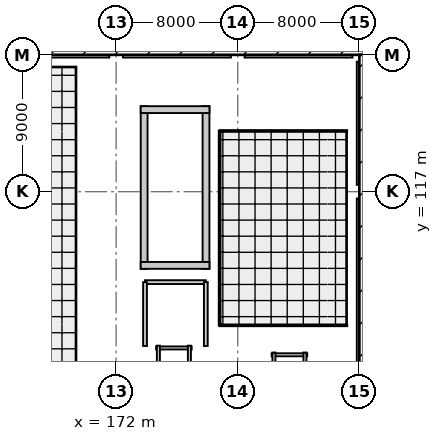
"""IFC4 building model, lengths in metres.
Left out: names, types, materials, properties, quantities, classifications, styles, units other than length and angle.
Written with IfcOpenShell. Run it as: python <this file> out.ifc"""

import sys

from ifc_helpers import new_model, si_unit, direction, frame, frame_2d, origin, origin_2d, place, context, subcontext, project, spatial, rectangle, extrude, element, fill, save


model = new_model("IFC4")
c1 = context("Model", 3, precision=1e-05, world=origin(), true_north=direction((0.0, 1.0)))
c2 = subcontext(c1, "Body", "Model", "MODEL_VIEW")
j1 = project(units=[si_unit("LENGTHUNIT", "METRE"), si_unit("PLANEANGLEUNIT", "RADIAN")], contexts=[c1])
p1 = place(None, origin())
s1 = spatial("IfcSite", under=j1, at=p1, CompositionType="ELEMENT")
p2 = place(p1, origin())
s2 = spatial("IfcBuilding", under=s1, at=p2, CompositionType="ELEMENT")
p3 = place(p2, origin())
s3 = spatial("IfcBuildingStorey", under=s2, at=p3, CompositionType="ELEMENT", Elevation=0.0)
for number, where, z_axis, x_axis in (
    (1, (172.0, 117.0, 0.0), (0.0, 0.0, 1.0), (1.0, 0.0, 0.0)),
    (2, (172.0, 126.0, 0.0), (0.0, 0.0, 1.0), (1.0, 0.0, 0.0)),
    (3, (180.0, 117.0, 0.0), (0.0, 0.0, 1.0), (1.0, 0.0, 0.0)),
    (4, (180.0, 126.0, 0.0), (0.0, 0.0, 1.0), (1.0, 0.0, 0.0)),
    (5, (188.0, 117.0, 0.0), (0.0, 0.0, 1.0), (1.0, 0.0, 0.0)),
    (6, (188.0, 126.0, 0.0), (0.0, 0.0, 1.0), (1.0, 0.0, 0.0)),
):
    element("IfcColumn", number, at=place(p3, frame(where, z_axis=z_axis, x_axis=x_axis)), inside=s3, PredefinedType="COLUMN", context=c2, shape_type="SweptSolid", body=[
        extrude(rectangle(XDim=0.9, YDim=0.9, at=origin_2d()), origin(), (0.0, 0.0, 1.0), 6.6),
    ])
p4 = place(p3, frame((188.0, 116.55, 0.0), z_axis=(0.0, 0.0, 1.0), x_axis=(0.0, -1.0, 0.0)))
e7 = element("IfcWall", 7, at=p4, inside=s3, PredefinedType="SOLIDWALL", context=c2, shape_type="SweptSolid", body=[
    extrude(rectangle(XDim=12.6, YDim=0.34, at=frame_2d((6.3, 0.0))), origin(), (0.0, 0.0, 1.0), 5.755),
])
p5 = place(p4, frame((3.267, 0.0, 0.95)))
e8 = element("IfcOpeningElement", 8, at=p5, cuts=e7, PredefinedType="OPENING", context=c2, shape_type="SweptSolid", body=[
    extrude(rectangle(XDim=2.1, YDim=2.0, at=frame_2d((1.05, 1.0))), frame((0.0, 0.18, 0.0), z_axis=(0.0, -1.0, 0.0), x_axis=(1.0, 0.0, 0.0)), (0.0, 0.0, 1.0), 0.36),
])
p6 = place(p4, frame((7.383, 0.0, 0.95)))
e9 = element("IfcOpeningElement", 9, at=p6, cuts=e7, PredefinedType="OPENING", context=c2, shape_type="SweptSolid", body=[
    extrude(rectangle(XDim=1.8, YDim=2.0, at=frame_2d((0.9, 1.0))), frame((0.0, 0.18, 0.0), z_axis=(0.0, -1.0, 0.0), x_axis=(1.0, 0.0, 0.0)), (0.0, 0.0, 1.0), 0.36),
])
p7 = place(p3, frame((188.0, 125.55, 0.0), z_axis=(0.0, 0.0, 1.0), x_axis=(0.0, -1.0, 0.0)))
e10 = element("IfcWall", 10, at=p7, inside=s3, PredefinedType="SOLIDWALL", context=c2, shape_type="SweptSolid", body=[
    extrude(rectangle(XDim=8.1, YDim=0.34, at=frame_2d((4.05, 0.0))), origin(), (0.0, 0.0, 1.0), 5.755),
])
p8 = place(p7, frame((3.25, 0.0, 0.95)))
e11 = element("IfcOpeningElement", 11, at=p8, cuts=e10, PredefinedType="OPENING", context=c2, shape_type="SweptSolid", body=[
    extrude(rectangle(XDim=1.6, YDim=1.9, at=frame_2d((0.8, 0.95))), frame((0.0, 0.18, 0.0), z_axis=(0.0, -1.0, 0.0), x_axis=(1.0, 0.0, 0.0)), (0.0, 0.0, 1.0), 0.36),
])
p9 = place(p3, frame((163.45, 126.0, 0.0), z_axis=(0.0, 0.0, 1.0), x_axis=(1.0, 0.0, 0.0)))
e12 = element("IfcWall", 12, at=p9, inside=s3, PredefinedType="SOLIDWALL", context=c2, shape_type="SweptSolid", body=[
    extrude(rectangle(XDim=8.1, YDim=0.36, at=frame_2d((4.05, 0.0))), origin(), (0.0, 0.0, 1.0), 5.875),
])
p10 = place(p9, frame((2.85, 0.0, 0.0)))
e13 = element("IfcOpeningElement", 13, at=p10, cuts=e12, PredefinedType="OPENING", context=c2, shape_type="SweptSolid", body=[
    extrude(rectangle(XDim=2.4, YDim=2.5, at=frame_2d((1.2, 1.25))), frame((0.0, 0.19, 0.0), z_axis=(0.0, -1.0, 0.0), x_axis=(1.0, 0.0, 0.0)), (0.0, 0.0, 1.0), 0.38),
])
p11 = place(p3, frame((172.45, 126.0, 0.0), z_axis=(0.0, 0.0, 1.0), x_axis=(1.0, 0.0, 0.0)))
e14 = element("IfcWall", 14, at=p11, inside=s3, PredefinedType="SOLIDWALL", context=c2, shape_type="SweptSolid", body=[
    extrude(rectangle(XDim=7.1, YDim=0.36, at=frame_2d((3.55, 0.0))), origin(), (0.0, 0.0, 1.0), 5.875),
])
p12 = place(p11, frame((2.35, 0.0, 0.0)))
e15 = element("IfcOpeningElement", 15, at=p12, cuts=e14, PredefinedType="OPENING", context=c2, shape_type="SweptSolid", body=[
    extrude(rectangle(XDim=2.4, YDim=2.5, at=frame_2d((1.2, 1.25))), frame((0.0, 0.19, 0.0), z_axis=(0.0, -1.0, 0.0), x_axis=(1.0, 0.0, 0.0)), (0.0, 0.0, 1.0), 0.38),
])
p13 = place(p3, frame((180.45, 126.0, 0.0), z_axis=(0.0, 0.0, 1.0), x_axis=(1.0, 0.0, 0.0)))
e16 = element("IfcWall", 16, at=p13, inside=s3, PredefinedType="SOLIDWALL", context=c2, shape_type="SweptSolid", body=[
    extrude(rectangle(XDim=7.1, YDim=0.36, at=frame_2d((3.55, 0.0))), origin(), (0.0, 0.0, 1.0), 5.875),
])
p14 = place(p13, frame((2.35, 0.0, 0.95)))
e17 = element("IfcOpeningElement", 17, at=p14, cuts=e16, PredefinedType="OPENING", context=c2, shape_type="SweptSolid", body=[
    extrude(rectangle(XDim=2.4, YDim=2.1, at=frame_2d((1.2, 1.05))), frame((0.0, 0.19, 0.0), z_axis=(0.0, -1.0, 0.0), x_axis=(1.0, 0.0, 0.0)), (0.0, 0.0, 1.0), 0.38),
])
for number, where, z_axis, x_axis in (
    (18, (177.913, 111.925, 0.0), (0.0, 0.0, 1.0), (0.0, 1.0, 0.0)),
    (19, (173.843, 122.623, 0.0), (0.0, 0.0, 1.0), (0.0, -1.0, 0.0)),
):
    element("IfcWall", number, at=place(p3, frame(where, z_axis=z_axis, x_axis=x_axis)), inside=s3, PredefinedType="SHEAR", context=c2, shape_type="SweptSolid", body=[
        extrude(rectangle(XDim=10.698, YDim=0.45, at=frame_2d((5.349, 0.0))), origin(), (0.0, 0.0, 1.0), 6.36),
    ])
p15 = place(p3, frame((178.137, 122.397, 0.0), z_axis=(0.0, 0.0, 1.0), x_axis=(-1.0, 0.0, 0.0)))
e20 = element("IfcWall", 20, at=p15, inside=s3, PredefinedType="SHEAR", context=c2, shape_type="SweptSolid", body=[
    extrude(rectangle(XDim=4.52, YDim=0.45, at=frame_2d((2.26, 0.0))), origin(), (0.0, 0.0, 1.0), 6.36),
])
p16 = place(p3, frame((173.617, 112.15, 0.0), z_axis=(0.0, 0.0, 1.0), x_axis=(1.0, 0.0, 0.0)))
e21 = element("IfcWall", 21, at=p16, inside=s3, PredefinedType="SHEAR", context=c2, shape_type="SweptSolid", body=[
    extrude(rectangle(XDim=4.52, YDim=0.45, at=frame_2d((2.26, 0.0))), origin(), (0.0, 0.0, 1.0), 6.36),
])
p17 = place(p16, frame((1.15, 0.0, 0.0)))
e22 = element("IfcOpeningElement", 22, at=p17, cuts=e21, PredefinedType="OPENING", context=c2, shape_type="SweptSolid", body=[
    extrude(rectangle(XDim=1.3, YDim=2.1, at=frame_2d((0.65, 1.05))), frame((0.0, 0.235, 0.0), z_axis=(0.0, -1.0, 0.0), x_axis=(1.0, 0.0, 0.0)), (0.0, 0.0, 1.0), 0.47),
])
p18 = place(p3, frame((176.97, 106.72, 0.0), z_axis=(0.0, 0.0, 1.0), x_axis=(-1.0, 0.0, 0.0)))
e23 = element("IfcWall", 23, at=p18, inside=s3, PredefinedType="SOLIDWALL", context=c2, shape_type="SweptSolid", body=[
    extrude(rectangle(XDim=2.34, YDim=0.2, at=frame_2d((1.17, 0.0))), origin(), (0.0, 0.0, 1.0), 4.4),
])
p19 = place(p18, frame((0.57, 0.0, 0.0)))
e24 = element("IfcOpeningElement", 24, at=p19, cuts=e23, PredefinedType="OPENING", context=c2, shape_type="SweptSolid", body=[
    extrude(rectangle(XDim=1.2, YDim=2.15, at=frame_2d((0.6, 1.075))), frame((0.0, 0.11, 0.0), z_axis=(0.0, -1.0, 0.0), x_axis=(1.0, 0.0, 0.0)), (0.0, 0.0, 1.0), 0.22),
])
for number, where, z_axis, x_axis in (
    (25, (174.78, 106.87, 0.0), (0.0, 0.0, 1.0), (0.0, -1.0, 0.0)),
    (26, (176.82, 103.73, 0.0), (0.0, 0.0, 1.0), (0.0, 1.0, 0.0)),
):
    element("IfcWall", number, at=place(p3, frame(where, z_axis=z_axis, x_axis=x_axis)), inside=s3, PredefinedType="SOLIDWALL", context=c2, shape_type="SweptSolid", body=[
        extrude(rectangle(XDim=3.14, YDim=0.2, at=frame_2d((1.57, 0.0))), origin(), (0.0, 0.0, 1.0), 4.4),
    ])
p20 = place(p3, frame((184.57, 106.27, 0.0), z_axis=(0.0, 0.0, 1.0), x_axis=(-1.0, 0.0, 0.0)))
e27 = element("IfcWall", 27, at=p20, inside=s3, PredefinedType="SOLIDWALL", context=c2, shape_type="SweptSolid", body=[
    extrude(rectangle(XDim=2.34, YDim=0.2, at=frame_2d((1.17, 0.0))), origin(), (0.0, 0.0, 1.0), 4.4),
])
for number, where, z_axis, x_axis in (
    (28, (182.38, 106.42, 0.0), (0.0, 0.0, 1.0), (0.0, -1.0, 0.0)),
    (29, (184.42, 103.58, 0.0), (0.0, 0.0, 1.0), (0.0, 1.0, 0.0)),
):
    element("IfcWall", number, at=place(p3, frame(where, z_axis=z_axis, x_axis=x_axis)), inside=s3, PredefinedType="SOLIDWALL", context=c2, shape_type="SweptSolid", body=[
        extrude(rectangle(XDim=2.84, YDim=0.2, at=frame_2d((1.42, 0.0))), origin(), (0.0, 0.0, 1.0), 4.4),
    ])
p21 = place(p3, frame((187.2, 108.2, 0.0), z_axis=(0.0, 0.0, 1.0), x_axis=(-1.0, 0.0, 0.0)))
e30 = element("IfcWall", 30, at=p21, inside=s3, PredefinedType="PARTITIONING", context=c2, shape_type="SweptSolid", body=[
    extrude(rectangle(XDim=8.4, YDim=0.1, at=frame_2d((4.2, 0.0))), origin(), (0.0, 0.0, 1.0), 4.4),
])
p22 = place(p3, frame((178.8, 121.0, 0.0), z_axis=(0.0, 0.0, 1.0), x_axis=(1.0, 0.0, 0.0)))
e31 = element("IfcWall", 31, at=p22, inside=s3, PredefinedType="PARTITIONING", context=c2, shape_type="SweptSolid", body=[
    extrude(rectangle(XDim=8.4, YDim=0.1, at=frame_2d((4.2, 0.0))), origin(), (0.0, 0.0, 1.0), 4.4),
])
p23 = place(p22, frame((3.575, 0.0, 0.0)))
e32 = element("IfcOpeningElement", 32, at=p23, cuts=e31, PredefinedType="OPENING", context=c2, shape_type="SweptSolid", body=[
    extrude(rectangle(XDim=1.25, YDim=2.1, at=frame_2d((0.625, 1.05))), frame((0.0, 0.06, 0.0), z_axis=(0.0, -1.0, 0.0), x_axis=(1.0, 0.0, 0.0)), (0.0, 0.0, 1.0), 0.12),
])
p24 = place(p3, frame((178.8, 108.2, 0.0), z_axis=(0.0, 0.0, 1.0), x_axis=(0.0, 1.0, 0.0)))
e33 = element("IfcWall", 33, at=p24, inside=s3, PredefinedType="PARTITIONING", context=c2, shape_type="SweptSolid", body=[
    extrude(rectangle(XDim=12.8, YDim=0.1, at=frame_2d((6.4, 0.0))), origin(), (0.0, 0.0, 1.0), 4.4),
])
p25 = place(p3, frame((173.9, 111.05, 0.0), z_axis=(0.0, 0.0, 1.0), x_axis=(1.0, 0.0, 0.0)))
e34 = element("IfcWall", 34, at=p25, inside=s3, PredefinedType="SOLIDWALL", context=c2, shape_type="SweptSolid", body=[
    extrude(rectangle(XDim=4.0, YDim=0.25, at=frame_2d((2.0, 0.0))), origin(), (0.0, 0.0, 1.0), 4.4),
])
p26 = place(p3, frame((173.9, 106.85, 0.0), z_axis=(0.0, 0.0, 1.0), x_axis=(0.0, 1.0, 0.0)))
e35 = element("IfcWall", 35, at=p26, inside=s3, PredefinedType="SOLIDWALL", context=c2, shape_type="SweptSolid", body=[
    extrude(rectangle(XDim=4.2, YDim=0.25, at=frame_2d((2.1, 0.0))), origin(), (0.0, 0.0, 1.0), 4.4),
])
p27 = place(p26, frame((1.4, 0.0, 0.0)))
e36 = element("IfcOpeningElement", 36, at=p27, cuts=e35, PredefinedType="OPENING", context=c2, shape_type="SweptSolid", body=[
    extrude(rectangle(XDim=1.4, YDim=2.1, at=frame_2d((0.7, 1.05))), frame((0.0, 0.135, 0.0), z_axis=(0.0, -1.0, 0.0), x_axis=(1.0, 0.0, 0.0)), (0.0, 0.0, 1.0), 0.27),
])
p28 = place(p3, frame((177.9, 111.05, 0.0), z_axis=(0.0, 0.0, 1.0), x_axis=(0.0, -1.0, 0.0)))
e37 = element("IfcWall", 37, at=p28, inside=s3, PredefinedType="SOLIDWALL", context=c2, shape_type="SweptSolid", body=[
    extrude(rectangle(XDim=4.2, YDim=0.25, at=frame_2d((2.1, 0.0))), origin(), (0.0, 0.0, 1.0), 4.4),
])
p29 = place(p5, origin())
e38 = element("IfcWindow", 38, at=p29, inside=s3, PartitioningType="SINGLE_PANEL", PredefinedType="WINDOW", context=c2, shape_type="SweptSolid", body=[
    extrude(rectangle(XDim=2.1, YDim=2.0, at=frame_2d((1.05, 1.0))), frame((0.0, 0.03, 0.0), z_axis=(0.0, -1.0, 0.0), x_axis=(1.0, 0.0, 0.0)), (0.0, 0.0, 1.0), 0.06),
])
fill(e8, e38)
p30 = place(p6, origin())
e39 = element("IfcWindow", 39, at=p30, inside=s3, PartitioningType="SINGLE_PANEL", PredefinedType="WINDOW", context=c2, shape_type="SweptSolid", body=[
    extrude(rectangle(XDim=1.8, YDim=2.0, at=frame_2d((0.9, 1.0))), frame((0.0, 0.03, 0.0), z_axis=(0.0, -1.0, 0.0), x_axis=(1.0, 0.0, 0.0)), (0.0, 0.0, 1.0), 0.06),
])
fill(e9, e39)
p31 = place(p8, origin())
e40 = element("IfcWindow", 40, at=p31, inside=s3, PartitioningType="SINGLE_PANEL", PredefinedType="WINDOW", context=c2, shape_type="SweptSolid", body=[
    extrude(rectangle(XDim=1.6, YDim=1.9, at=frame_2d((0.8, 0.95))), frame((0.0, 0.03, 0.0), z_axis=(0.0, -1.0, 0.0), x_axis=(1.0, 0.0, 0.0)), (0.0, 0.0, 1.0), 0.06),
])
fill(e11, e40)
p32 = place(p10, origin())
e41 = element("IfcDoor", 41, at=p32, inside=s3, OperationType="SINGLE_SWING_RIGHT", PredefinedType="DOOR", context=c2, shape_type="SweptSolid", body=[
    extrude(rectangle(XDim=2.4, YDim=2.5, at=frame_2d((1.2, 1.25))), frame((0.0, 0.025, 0.0), z_axis=(0.0, -1.0, 0.0), x_axis=(1.0, 0.0, 0.0)), (0.0, 0.0, 1.0), 0.05),
])
fill(e13, e41)
p33 = place(p12, origin())
e42 = element("IfcDoor", 42, at=p33, inside=s3, OperationType="SINGLE_SWING_LEFT", PredefinedType="DOOR", context=c2, shape_type="SweptSolid", body=[
    extrude(rectangle(XDim=2.4, YDim=2.5, at=frame_2d((1.2, 1.25))), frame((0.0, 0.025, 0.0), z_axis=(0.0, -1.0, 0.0), x_axis=(1.0, 0.0, 0.0)), (0.0, 0.0, 1.0), 0.05),
])
fill(e15, e42)
p34 = place(p14, origin())
e43 = element("IfcWindow", 43, at=p34, inside=s3, PartitioningType="SINGLE_PANEL", PredefinedType="WINDOW", context=c2, shape_type="SweptSolid", body=[
    extrude(rectangle(XDim=2.4, YDim=2.1, at=frame_2d((1.2, 1.05))), frame((0.0, 0.03, 0.0), z_axis=(0.0, -1.0, 0.0), x_axis=(1.0, 0.0, 0.0)), (0.0, 0.0, 1.0), 0.06),
])
fill(e17, e43)
p35 = place(p17, origin())
e44 = element("IfcDoor", 44, at=p35, inside=s3, OperationType="SINGLE_SWING_LEFT", PredefinedType="DOOR", context=c2, shape_type="SweptSolid", body=[
    extrude(rectangle(XDim=1.3, YDim=2.1, at=frame_2d((0.65, 1.05))), frame((0.0, 0.025, 0.0), z_axis=(0.0, -1.0, 0.0), x_axis=(1.0, 0.0, 0.0)), (0.0, 0.0, 1.0), 0.05),
])
fill(e22, e44)
p36 = place(p19, origin())
e45 = element("IfcDoor", 45, at=p36, inside=s3, OperationType="SLIDING_TO_LEFT", PredefinedType="DOOR", context=c2, shape_type="SweptSolid", body=[
    extrude(rectangle(XDim=1.2, YDim=2.15, at=frame_2d((0.6, 1.075))), frame((0.0, 0.025, 0.0), z_axis=(0.0, -1.0, 0.0), x_axis=(1.0, 0.0, 0.0)), (0.0, 0.0, 1.0), 0.05),
])
fill(e24, e45)
p37 = place(p23, origin())
e46 = element("IfcDoor", 46, at=p37, inside=s3, OperationType="SINGLE_SWING_RIGHT", PredefinedType="DOOR", context=c2, shape_type="SweptSolid", body=[
    extrude(rectangle(XDim=1.25, YDim=2.1, at=frame_2d((0.625, 1.05))), frame((0.0, 0.025, 0.0), z_axis=(0.0, -1.0, 0.0), x_axis=(1.0, 0.0, 0.0)), (0.0, 0.0, 1.0), 0.05),
])
fill(e32, e46)
p38 = place(p27, origin())
e47 = element("IfcDoor", 47, at=p38, inside=s3, OperationType="SINGLE_SWING_RIGHT", PredefinedType="DOOR", context=c2, shape_type="SweptSolid", body=[
    extrude(rectangle(XDim=1.4, YDim=2.1, at=frame_2d((0.7, 1.05))), frame((0.0, 0.025, 0.0), z_axis=(0.0, -1.0, 0.0), x_axis=(1.0, 0.0, 0.0)), (0.0, 0.0, 1.0), 0.05),
])
fill(e36, e47)
save(model, sys.argv[1])
